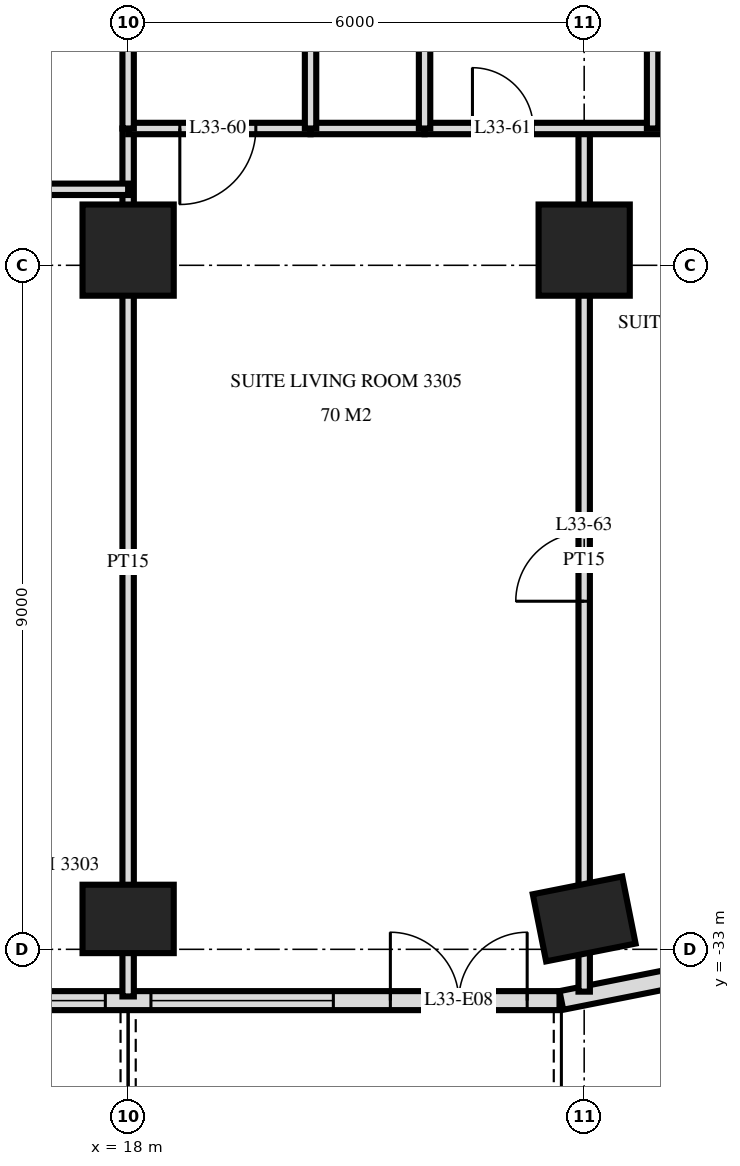
"""IFC4 building model, lengths in metres.
Left out: names, types, materials, properties, quantities, classifications, styles, units other than length and angle.
Written with IfcOpenShell. Run it as: python <this file> out.ifc"""

import sys

from ifc_helpers import new_model, si_unit, direction, frame, frame_2d, origin, origin_2d, place, context, subcontext, project, spatial, rectangle, extrude, element, fill, save


model = new_model("IFC4")
c1 = context("Model", 3, precision=1e-05, world=origin(), true_north=direction((0.0, 1.0)))
c2 = subcontext(c1, "Body", "Model", "MODEL_VIEW")
j1 = project(units=[si_unit("LENGTHUNIT", "METRE"), si_unit("PLANEANGLEUNIT", "RADIAN")], contexts=[c1])
p1 = place(None, origin())
s1 = spatial("IfcSite", under=j1, at=p1, CompositionType="ELEMENT")
p2 = place(p1, origin())
s2 = spatial("IfcBuilding", under=s1, at=p2, CompositionType="ELEMENT")
p3 = place(p2, frame((0.0, 0.0, 130.8)))
s3 = spatial("IfcBuildingStorey", under=s2, at=p3, CompositionType="ELEMENT", Elevation=130.8)
p4 = place(p3, frame((18.0, -32.6, 0.0), z_axis=(0.0, 0.0, 1.0), x_axis=(1.0, 0.0, 0.0)))
e1 = element("IfcColumn", 1, at=p4, inside=s3, PredefinedType="COLUMN", context=c2, shape_type="SweptSolid", body=[
    extrude(rectangle(XDim=1.2, YDim=0.9, at=origin_2d()), origin(), (0.0, 0.0, 1.0), 3.6),
])
p5 = place(p3, frame((18.0, -23.8, 0.0), z_axis=(0.0, 0.0, 1.0), x_axis=(1.0, 0.0, 0.0)))
e2 = element("IfcColumn", 2, at=p5, inside=s3, PredefinedType="COLUMN", context=c2, shape_type="SweptSolid", body=[
    extrude(rectangle(XDim=1.2, YDim=1.2, at=origin_2d()), origin(), (0.0, 0.0, 1.0), 3.6),
])
p6 = place(p3, frame((24.0, -32.6, 0.0), z_axis=(0.0, 0.0, 1.0), x_axis=(0.980792089743, 0.195056086032, 0.0)))
e3 = element("IfcColumn", 3, at=p6, inside=s3, PredefinedType="COLUMN", context=c2, shape_type="SweptSolid", body=[
    extrude(rectangle(XDim=1.2, YDim=0.9, at=origin_2d()), origin(), (0.0, 0.0, 1.0), 3.6),
])
p7 = place(p3, frame((24.0, -23.8, 0.0), z_axis=(0.0, 0.0, 1.0), x_axis=(1.0, 0.0, 0.0)))
e4 = element("IfcColumn", 4, at=p7, inside=s3, PredefinedType="COLUMN", context=c2, shape_type="SweptSolid", body=[
    extrude(rectangle(XDim=1.2, YDim=1.2, at=origin_2d()), origin(), (0.0, 0.0, 1.0), 3.6),
])
p8 = place(p3, frame((-23.675, -33.675, 0.0), z_axis=(0.0, 0.0, 1.0), x_axis=(1.0, 0.0, 0.0)))
e5 = element("IfcWall", 5, at=p8, inside=s3, PredefinedType="SOLIDWALL", context=c2, shape_type="SweptSolid", body=[
    extrude(rectangle(XDim=47.351, YDim=0.25, at=frame_2d((23.675, 0.0))), origin(), (0.0, 0.0, 1.0), 3.32),
])
p9 = place(p8, frame((3.425, 0.0, 0.0)))
e6 = element("IfcOpeningElement", 6, at=p9, cuts=e5, PredefinedType="OPENING", context=c2, shape_type="SweptSolid", body=[
    extrude(rectangle(XDim=1.8, YDim=2.4, at=frame_2d((0.9, 1.2))), frame((0.0, 0.135, 0.0), z_axis=(0.0, -1.0, 0.0), x_axis=(1.0, 0.0, 0.0)), (0.0, 0.0, 1.0), 0.27),
])
p10 = place(p8, frame((6.275, 0.0, 0.0)))
e7 = element("IfcOpeningElement", 7, at=p10, cuts=e5, PredefinedType="OPENING", context=c2, shape_type="SweptSolid", body=[
    extrude(rectangle(XDim=1.8, YDim=2.4, at=frame_2d((0.9, 1.2))), frame((0.0, 0.135, 0.0), z_axis=(0.0, -1.0, 0.0), x_axis=(1.0, 0.0, 0.0)), (0.0, 0.0, 1.0), 0.27),
])
p11 = place(p8, frame((8.975, 0.0, 0.3)))
e8 = element("IfcOpeningElement", 8, at=p11, cuts=e5, PredefinedType="OPENING", context=c2, shape_type="SweptSolid", body=[
    extrude(rectangle(XDim=2.4, YDim=2.1, at=frame_2d((1.2, 1.05))), frame((0.0, 0.135, 0.0), z_axis=(0.0, -1.0, 0.0), x_axis=(1.0, 0.0, 0.0)), (0.0, 0.0, 1.0), 0.27),
])
p12 = place(p8, frame((12.275, 0.0, 0.0)))
e9 = element("IfcOpeningElement", 9, at=p12, cuts=e5, PredefinedType="OPENING", context=c2, shape_type="SweptSolid", body=[
    extrude(rectangle(XDim=1.8, YDim=2.4, at=frame_2d((0.9, 1.2))), frame((0.0, 0.135, 0.0), z_axis=(0.0, -1.0, 0.0), x_axis=(1.0, 0.0, 0.0)), (0.0, 0.0, 1.0), 0.27),
])
p13 = place(p8, frame((14.975, 0.0, 0.3)))
e10 = element("IfcOpeningElement", 10, at=p13, cuts=e5, PredefinedType="OPENING", context=c2, shape_type="SweptSolid", body=[
    extrude(rectangle(XDim=2.4, YDim=2.1, at=frame_2d((1.2, 1.05))), frame((0.0, 0.135, 0.0), z_axis=(0.0, -1.0, 0.0), x_axis=(1.0, 0.0, 0.0)), (0.0, 0.0, 1.0), 0.27),
])
p14 = place(p8, frame((17.975, 0.0, 0.3)))
e11 = element("IfcOpeningElement", 11, at=p14, cuts=e5, PredefinedType="OPENING", context=c2, shape_type="SweptSolid", body=[
    extrude(rectangle(XDim=2.4, YDim=2.1, at=frame_2d((1.2, 1.05))), frame((0.0, 0.135, 0.0), z_axis=(0.0, -1.0, 0.0), x_axis=(1.0, 0.0, 0.0)), (0.0, 0.0, 1.0), 0.27),
])
p15 = place(p8, frame((21.275, 0.0, 0.0)))
e12 = element("IfcOpeningElement", 12, at=p15, cuts=e5, PredefinedType="OPENING", context=c2, shape_type="SweptSolid", body=[
    extrude(rectangle(XDim=1.8, YDim=2.4, at=frame_2d((0.9, 1.2))), frame((0.0, 0.135, 0.0), z_axis=(0.0, -1.0, 0.0), x_axis=(1.0, 0.0, 0.0)), (0.0, 0.0, 1.0), 0.27),
])
p16 = place(p8, frame((24.275, 0.0, 0.0)))
e13 = element("IfcOpeningElement", 13, at=p16, cuts=e5, PredefinedType="OPENING", context=c2, shape_type="SweptSolid", body=[
    extrude(rectangle(XDim=1.8, YDim=2.4, at=frame_2d((0.9, 1.2))), frame((0.0, 0.135, 0.0), z_axis=(0.0, -1.0, 0.0), x_axis=(1.0, 0.0, 0.0)), (0.0, 0.0, 1.0), 0.27),
])
p17 = place(p8, frame((26.975, 0.0, 0.3)))
e14 = element("IfcOpeningElement", 14, at=p17, cuts=e5, PredefinedType="OPENING", context=c2, shape_type="SweptSolid", body=[
    extrude(rectangle(XDim=2.4, YDim=2.1, at=frame_2d((1.2, 1.05))), frame((0.0, 0.135, 0.0), z_axis=(0.0, -1.0, 0.0), x_axis=(1.0, 0.0, 0.0)), (0.0, 0.0, 1.0), 0.27),
])
p18 = place(p8, frame((30.275, 0.0, 0.0)))
e15 = element("IfcOpeningElement", 15, at=p18, cuts=e5, PredefinedType="OPENING", context=c2, shape_type="SweptSolid", body=[
    extrude(rectangle(XDim=1.8, YDim=2.4, at=frame_2d((0.9, 1.2))), frame((0.0, 0.135, 0.0), z_axis=(0.0, -1.0, 0.0), x_axis=(1.0, 0.0, 0.0)), (0.0, 0.0, 1.0), 0.27),
])
p19 = place(p8, frame((32.975, 0.0, 0.3)))
e16 = element("IfcOpeningElement", 16, at=p19, cuts=e5, PredefinedType="OPENING", context=c2, shape_type="SweptSolid", body=[
    extrude(rectangle(XDim=2.4, YDim=2.1, at=frame_2d((1.2, 1.05))), frame((0.0, 0.135, 0.0), z_axis=(0.0, -1.0, 0.0), x_axis=(1.0, 0.0, 0.0)), (0.0, 0.0, 1.0), 0.27),
])
p20 = place(p8, frame((36.275, 0.0, 0.0)))
e17 = element("IfcOpeningElement", 17, at=p20, cuts=e5, PredefinedType="OPENING", context=c2, shape_type="SweptSolid", body=[
    extrude(rectangle(XDim=1.8, YDim=2.4, at=frame_2d((0.9, 1.2))), frame((0.0, 0.135, 0.0), z_axis=(0.0, -1.0, 0.0), x_axis=(1.0, 0.0, 0.0)), (0.0, 0.0, 1.0), 0.27),
])
p21 = place(p8, frame((38.975, 0.0, 0.3)))
e18 = element("IfcOpeningElement", 18, at=p21, cuts=e5, PredefinedType="OPENING", context=c2, shape_type="SweptSolid", body=[
    extrude(rectangle(XDim=2.4, YDim=2.1, at=frame_2d((1.2, 1.05))), frame((0.0, 0.135, 0.0), z_axis=(0.0, -1.0, 0.0), x_axis=(1.0, 0.0, 0.0)), (0.0, 0.0, 1.0), 0.27),
])
p22 = place(p8, frame((41.975, 0.0, 0.3)))
e19 = element("IfcOpeningElement", 19, at=p22, cuts=e5, PredefinedType="OPENING", context=c2, shape_type="SweptSolid", body=[
    extrude(rectangle(XDim=2.4, YDim=2.1, at=frame_2d((1.2, 1.05))), frame((0.0, 0.135, 0.0), z_axis=(0.0, -1.0, 0.0), x_axis=(1.0, 0.0, 0.0)), (0.0, 0.0, 1.0), 0.27),
])
p23 = place(p8, frame((45.125, 0.0, 0.0)))
e20 = element("IfcOpeningElement", 20, at=p23, cuts=e5, PredefinedType="OPENING", context=c2, shape_type="SweptSolid", body=[
    extrude(rectangle(XDim=1.8, YDim=2.4, at=frame_2d((0.9, 1.2))), frame((0.0, 0.135, 0.0), z_axis=(0.0, -1.0, 0.0), x_axis=(1.0, 0.0, 0.0)), (0.0, 0.0, 1.0), 0.27),
])
p24 = place(p3, frame((23.7, -33.673, 0.0), z_axis=(0.0, 0.0, 1.0), x_axis=(0.980775640221, 0.19513878023, 0.0)))
e21 = element("IfcWall", 21, at=p24, inside=s3, PredefinedType="SOLIDWALL", context=c2, shape_type="SweptSolid", body=[
    extrude(rectangle(XDim=1.681, YDim=0.25, at=frame_2d((0.841, 0.0))), origin(), (0.0, 0.0, 1.0), 3.32),
])
p25 = place(p3, frame((24.9, -22.2, 0.0), z_axis=(0.0, 0.0, 1.0), x_axis=(0.0, 1.0, 0.0)))
e22 = element("IfcWall", 22, at=p25, inside=s3, PredefinedType="PARTITIONING", context=c2, shape_type="SweptSolid", body=[
    extrude(rectangle(XDim=4.2, YDim=0.15, at=frame_2d((2.1, 0.0))), origin(), (0.0, 0.0, 1.0), 3.32),
])
p26 = place(p3, frame((24.0, -33.557, 0.0), z_axis=(0.0, 0.0, 1.0), x_axis=(0.0, 1.0, 0.0)))
e23 = element("IfcWall", 23, at=p26, inside=s3, PredefinedType="PARTITIONING", context=c2, shape_type="SweptSolid", body=[
    extrude(rectangle(XDim=11.357, YDim=0.15, at=frame_2d((5.678, 0.0))), origin(), (0.0, 0.0, 1.0), 3.32),
])
p27 = place(p26, frame((5.137, 0.0, 0.0)))
e24 = element("IfcOpeningElement", 24, at=p27, cuts=e23, PredefinedType="OPENING", context=c2, shape_type="SweptSolid", body=[
    extrude(rectangle(XDim=0.9, YDim=2.1, at=frame_2d((0.45, 1.05))), frame((0.0, 0.085, 0.0), z_axis=(0.0, -1.0, 0.0), x_axis=(1.0, 0.0, 0.0)), (0.0, 0.0, 1.0), 0.17),
])
p28 = place(p3, frame((21.9, -22.2, 0.0), z_axis=(0.0, 0.0, 1.0), x_axis=(0.0, 1.0, 0.0)))
e25 = element("IfcWall", 25, at=p28, inside=s3, PredefinedType="PLUMBINGWALL", context=c2, shape_type="SweptSolid", body=[
    extrude(rectangle(XDim=4.2, YDim=0.15, at=frame_2d((2.1, 0.0))), origin(), (0.0, 0.0, 1.0), 3.32),
])
p29 = place(p3, frame((20.4, -22.2, 0.0), z_axis=(0.0, 0.0, 1.0), x_axis=(0.0, 1.0, 0.0)))
e26 = element("IfcWall", 26, at=p29, inside=s3, PredefinedType="PARTITIONING", context=c2, shape_type="SweptSolid", body=[
    extrude(rectangle(XDim=4.2, YDim=0.15, at=frame_2d((2.1, 0.0))), origin(), (0.0, 0.0, 1.0), 3.32),
])
p30 = place(p29, frame((1.6, 0.0, 0.0)))
e27 = element("IfcOpeningElement", 27, at=p30, cuts=e26, PredefinedType="OPENING", context=c2, shape_type="SweptSolid", body=[
    extrude(rectangle(XDim=1.0, YDim=2.1, at=frame_2d((0.5, 1.05))), frame((0.0, 0.085, 0.0), z_axis=(0.0, -1.0, 0.0), x_axis=(1.0, 0.0, 0.0)), (0.0, 0.0, 1.0), 0.17),
])
p31 = place(p3, frame((18.0, -22.2, 0.0), z_axis=(0.0, 0.0, 1.0), x_axis=(0.0, 1.0, 0.0)))
e28 = element("IfcWall", 28, at=p31, inside=s3, PredefinedType="PARTITIONING", context=c2, shape_type="SweptSolid", body=[
    extrude(rectangle(XDim=4.2, YDim=0.15, at=frame_2d((2.1, 0.0))), origin(), (0.0, 0.0, 1.0), 3.32),
])
p32 = place(p3, frame((18.0, -33.62, 0.0), z_axis=(0.0, 0.0, 1.0), x_axis=(0.0, 1.0, 0.0)))
e29 = element("IfcWall", 29, at=p32, inside=s3, PredefinedType="PARTITIONING", context=c2, shape_type="SweptSolid", body=[
    extrude(rectangle(XDim=11.42, YDim=0.15, at=frame_2d((5.71, 0.0))), origin(), (0.0, 0.0, 1.0), 3.32),
])
p33 = place(p3, frame((16.3, -23.0, 0.0), z_axis=(0.0, 0.0, 1.0), x_axis=(1.0, 0.0, 0.0)))
e30 = element("IfcWall", 30, at=p33, inside=s3, PredefinedType="PARTITIONING", context=c2, shape_type="SweptSolid", body=[
    extrude(rectangle(XDim=1.7, YDim=0.15, at=frame_2d((0.85, 0.0))), origin(), (0.0, 0.0, 1.0), 3.32),
])
p34 = place(p3, frame((18.0, -22.2, 0.0), z_axis=(0.0, 0.0, 1.0), x_axis=(1.0, 0.0, 0.0)))
e31 = element("IfcWall", 31, at=p34, inside=s3, PredefinedType="PARTITIONING", context=c2, shape_type="SweptSolid", body=[
    extrude(rectangle(XDim=2.4, YDim=0.15, at=frame_2d((1.2, 0.0))), origin(), (0.0, 0.0, 1.0), 3.32),
])
p35 = place(p34, frame((0.68, 0.0, 0.0)))
e32 = element("IfcOpeningElement", 32, at=p35, cuts=e31, PredefinedType="OPENING", context=c2, shape_type="SweptSolid", body=[
    extrude(rectangle(XDim=1.0, YDim=2.1, at=frame_2d((0.5, 1.05))), frame((0.0, 0.085, 0.0), z_axis=(0.0, -1.0, 0.0), x_axis=(1.0, 0.0, 0.0)), (0.0, 0.0, 1.0), 0.17),
])
p36 = place(p3, frame((21.9, -22.2, 0.0), z_axis=(0.0, 0.0, 1.0), x_axis=(1.0, 0.0, 0.0)))
e33 = element("IfcWall", 33, at=p36, inside=s3, PredefinedType="PARTITIONING", context=c2, shape_type="SweptSolid", body=[
    extrude(rectangle(XDim=6.12, YDim=0.15, at=frame_2d((3.06, 0.0))), origin(), (0.0, 0.0, 1.0), 3.32),
])
p37 = place(p36, frame((0.63, 0.0, 0.0)))
e34 = element("IfcOpeningElement", 34, at=p37, cuts=e33, PredefinedType="OPENING", context=c2, shape_type="SweptSolid", body=[
    extrude(rectangle(XDim=0.8, YDim=2.1, at=frame_2d((0.4, 1.05))), frame((0.0, 0.085, 0.0), z_axis=(0.0, -1.0, 0.0), x_axis=(1.0, 0.0, 0.0)), (0.0, 0.0, 1.0), 0.17),
])
p38 = place(p36, frame((3.73, 0.0, 0.0)))
e35 = element("IfcOpeningElement", 35, at=p38, cuts=e33, PredefinedType="OPENING", context=c2, shape_type="SweptSolid", body=[
    extrude(rectangle(XDim=0.9, YDim=2.1, at=frame_2d((0.45, 1.05))), frame((0.0, 0.085, 0.0), z_axis=(0.0, -1.0, 0.0), x_axis=(1.0, 0.0, 0.0)), (0.0, 0.0, 1.0), 0.17),
])
p39 = place(p3, frame((20.4, -22.2, 0.0), z_axis=(0.0, 0.0, 1.0), x_axis=(1.0, 0.0, 0.0)))
e36 = element("IfcWall", 36, at=p39, inside=s3, PredefinedType="PLUMBINGWALL", context=c2, shape_type="SweptSolid", body=[
    extrude(rectangle(XDim=1.5, YDim=0.15, at=frame_2d((0.75, 0.0))), origin(), (0.0, 0.0, 1.0), 3.32),
])
p40 = place(p21, origin())
e37 = element("IfcWindow", 37, at=p40, inside=s3, PartitioningType="SINGLE_PANEL", PredefinedType="WINDOW", context=c2, shape_type="SweptSolid", body=[
    extrude(rectangle(XDim=2.4, YDim=2.1, at=frame_2d((1.2, 1.05))), frame((0.0, 0.03, 0.0), z_axis=(0.0, -1.0, 0.0), x_axis=(1.0, 0.0, 0.0)), (0.0, 0.0, 1.0), 0.06),
])
fill(e18, e37)
p41 = place(p22, origin())
e38 = element("IfcWindow", 38, at=p41, inside=s3, PartitioningType="SINGLE_PANEL", PredefinedType="WINDOW", context=c2, shape_type="SweptSolid", body=[
    extrude(rectangle(XDim=2.4, YDim=2.1, at=frame_2d((1.2, 1.05))), frame((0.0, 0.03, 0.0), z_axis=(0.0, -1.0, 0.0), x_axis=(1.0, 0.0, 0.0)), (0.0, 0.0, 1.0), 0.06),
])
fill(e19, e38)
p42 = place(p23, origin())
e39 = element("IfcDoor", 39, at=p42, inside=s3, OperationType="DOUBLE_DOOR_SINGLE_SWING", PredefinedType="DOOR", context=c2, shape_type="SweptSolid", body=[
    extrude(rectangle(XDim=1.8, YDim=2.4, at=frame_2d((0.9, 1.2))), frame((0.0, 0.025, 0.0), z_axis=(0.0, -1.0, 0.0), x_axis=(1.0, 0.0, 0.0)), (0.0, 0.0, 1.0), 0.05),
])
fill(e20, e39)
p43 = place(p35, frame((0.5, 0.0, 0.0), z_axis=(0.0, 0.0, 1.0), x_axis=(-1.0, 0.0, 0.0)))
e40 = element("IfcDoor", 40, at=p43, inside=s3, OperationType="SINGLE_SWING_LEFT", PredefinedType="DOOR", context=c2, shape_type="SweptSolid", body=[
    extrude(rectangle(XDim=1.0, YDim=2.1, at=frame_2d((0.0, 1.05))), frame((0.0, -0.025, 0.0), z_axis=(0.0, 1.0, 0.0), x_axis=(-1.0, 0.0, 0.0)), (0.0, 0.0, 1.0), 0.05),
])
fill(e32, e40)
p44 = place(p37, origin())
e41 = element("IfcDoor", 41, at=p44, inside=s3, OperationType="SINGLE_SWING_RIGHT", PredefinedType="DOOR", context=c2, shape_type="SweptSolid", body=[
    extrude(rectangle(XDim=0.8, YDim=2.1, at=frame_2d((0.4, 1.05))), frame((0.0, 0.025, 0.0), z_axis=(0.0, -1.0, 0.0), x_axis=(1.0, 0.0, 0.0)), (0.0, 0.0, 1.0), 0.05),
])
fill(e34, e41)
p45 = place(p27, origin())
e42 = element("IfcDoor", 42, at=p45, inside=s3, OperationType="SINGLE_SWING_RIGHT", PredefinedType="DOOR", context=c2, shape_type="SweptSolid", body=[
    extrude(rectangle(XDim=0.9, YDim=2.1, at=frame_2d((0.45, 1.05))), frame((0.0, 0.025, 0.0), z_axis=(0.0, -1.0, 0.0), x_axis=(1.0, 0.0, 0.0)), (0.0, 0.0, 1.0), 0.05),
])
fill(e24, e42)
save(model, sys.argv[1])
